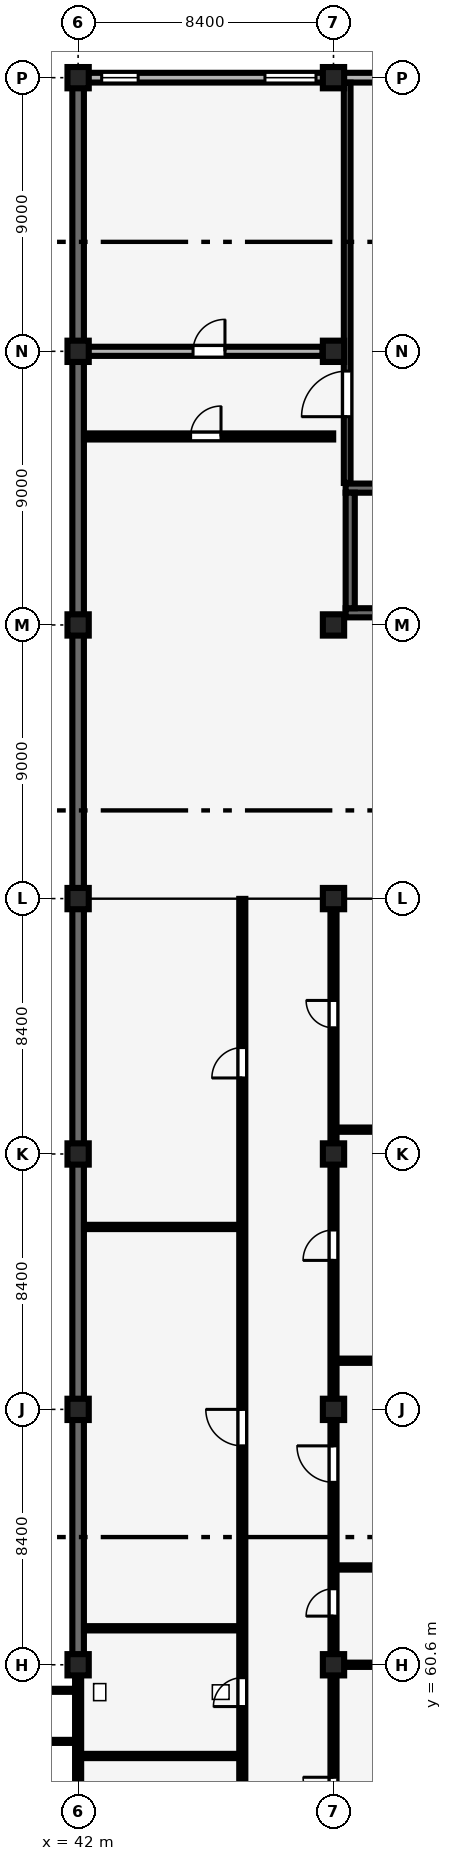
"""IFC4 building model, lengths in metres.
Left out: names, types, materials, properties, quantities, classifications, styles, units other than length and angle.
Written with IfcOpenShell. Run it as: python <this file> out.ifc"""

import sys

from ifc_helpers import new_model, si_unit, direction, frame, frame_2d, origin, origin_2d, place, context, subcontext, project, spatial, rectangle, extrude, element, fill, save


model = new_model("IFC4")
c1 = context("Model", 3, precision=1e-05, world=origin(), true_north=direction((0.0, 1.0)))
c2 = subcontext(c1, "Body", "Model", "MODEL_VIEW")
j1 = project(units=[si_unit("LENGTHUNIT", "METRE"), si_unit("PLANEANGLEUNIT", "RADIAN")], contexts=[c1])
p1 = place(None, origin())
s1 = spatial("IfcSite", under=j1, at=p1, CompositionType="ELEMENT")
p2 = place(p1, origin())
s2 = spatial("IfcBuilding", under=s1, at=p2, CompositionType="ELEMENT")
p3 = place(p2, origin())
s3 = spatial("IfcBuildingStorey", under=s2, at=p3, CompositionType="ELEMENT", Elevation=0.0)
for number, where, z_axis, x_axis in (
    (1, (42.0, 60.6, 0.0), (0.0, 0.0, 1.0), (1.0, 0.0, 0.0)),
    (2, (42.0, 69.0, 0.0), (0.0, 0.0, 1.0), (1.0, 0.0, 0.0)),
    (3, (42.0, 77.4, 0.0), (0.0, 0.0, 1.0), (1.0, 0.0, 0.0)),
    (4, (42.0, 85.8, 0.0), (0.0, 0.0, 1.0), (1.0, 0.0, 0.0)),
    (5, (42.0, 94.8, 0.0), (0.0, 0.0, 1.0), (1.0, 0.0, 0.0)),
    (6, (42.0, 103.8, 0.0), (0.0, 0.0, 1.0), (1.0, 0.0, 0.0)),
    (7, (42.0, 112.8, 0.0), (0.0, 0.0, 1.0), (1.0, 0.0, 0.0)),
    (8, (50.4, 60.6, 0.0), (0.0, 0.0, 1.0), (1.0, 0.0, 0.0)),
    (9, (50.4, 69.0, 0.0), (0.0, 0.0, 1.0), (1.0, 0.0, 0.0)),
    (10, (50.4, 77.4, 0.0), (0.0, 0.0, 1.0), (1.0, 0.0, 0.0)),
    (11, (50.4, 85.8, 0.0), (0.0, 0.0, 1.0), (1.0, 0.0, 0.0)),
    (12, (50.4, 94.8, 0.0), (0.0, 0.0, 1.0), (1.0, 0.0, 0.0)),
    (13, (50.4, 103.8, 0.0), (0.0, 0.0, 1.0), (1.0, 0.0, 0.0)),
    (14, (50.4, 112.8, 0.0), (0.0, 0.0, 1.0), (1.0, 0.0, 0.0)),
):
    element("IfcColumn", number, at=place(p3, frame(where, z_axis=z_axis, x_axis=x_axis)), inside=s3, PredefinedType="COLUMN", context=c2, shape_type="SweptSolid", body=[
        extrude(rectangle(XDim=0.7, YDim=0.7, at=origin_2d()), origin(), (0.0, 0.0, 1.0), 4.8),
    ])
p4 = place(p3, frame((42.325, 112.8, 0.0), z_axis=(0.0, 0.0, 1.0), x_axis=(1.0, 0.0, 0.0)))
e15 = element("IfcWall", 15, at=p4, inside=s3, PredefinedType="SOLIDWALL", context=c2, shape_type="SweptSolid", body=[
    extrude(rectangle(XDim=7.75, YDim=0.32, at=frame_2d((3.875, 0.0))), origin(), (0.0, 0.0, 1.0), 3.92),
])
p5 = place(p4, frame((0.45, 0.0, 0.9)))
e16 = element("IfcOpeningElement", 16, at=p5, cuts=e15, PredefinedType="OPENING", context=c2, shape_type="SweptSolid", body=[
    extrude(rectangle(XDim=1.2, YDim=1.8, at=frame_2d((0.6, 0.9))), frame((0.0, 0.17, 0.0), z_axis=(0.0, -1.0, 0.0), x_axis=(1.0, 0.0, 0.0)), (0.0, 0.0, 1.0), 0.34),
])
p6 = place(p4, frame((5.82, 0.0, 0.9)))
e17 = element("IfcOpeningElement", 17, at=p6, cuts=e15, PredefinedType="OPENING", context=c2, shape_type="SweptSolid", body=[
    extrude(rectangle(XDim=1.68, YDim=2.4, at=frame_2d((0.84, 1.2))), frame((0.0, 0.17, 0.0), z_axis=(0.0, -1.0, 0.0), x_axis=(1.0, 0.0, 0.0)), (0.0, 0.0, 1.0), 0.34),
])
p7 = place(p3, frame((50.725, 112.8, 0.0), z_axis=(0.0, 0.0, 1.0), x_axis=(1.0, 0.0, 0.0)))
e18 = element("IfcWall", 18, at=p7, inside=s3, PredefinedType="SOLIDWALL", context=c2, shape_type="SweptSolid", body=[
    extrude(rectangle(XDim=7.75, YDim=0.32, at=frame_2d((3.875, 0.0))), origin(), (0.0, 0.0, 1.0), 3.87),
])
p8 = place(p7, frame((1.125, 0.0, 0.0)))
e19 = element("IfcOpeningElement", 19, at=p8, cuts=e18, PredefinedType="OPENING", context=c2, shape_type="SweptSolid", body=[
    extrude(rectangle(XDim=1.65, YDim=2.25, at=frame_2d((0.825, 1.125))), frame((0.0, 0.17, 0.0), z_axis=(0.0, -1.0, 0.0), x_axis=(1.0, 0.0, 0.0)), (0.0, 0.0, 1.0), 0.34),
])
for number, where, z_axis, x_axis in (
    (20, (42.0, 86.125, 0.0), (0.0, 0.0, 1.0), (0.0, 1.0, 0.0)),
    (21, (42.0, 95.125, 0.0), (0.0, 0.0, 1.0), (0.0, 1.0, 0.0)),
    (22, (42.0, 104.125, 0.0), (0.0, 0.0, 1.0), (0.0, 1.0, 0.0)),
):
    element("IfcWall", number, at=place(p3, frame(where, z_axis=z_axis, x_axis=x_axis)), inside=s3, PredefinedType="SHEAR", context=c2, shape_type="SweptSolid", body=[
        extrude(rectangle(XDim=8.35, YDim=0.38, at=frame_2d((4.175, 0.0))), origin(), (0.0, 0.0, 1.0), 3.912),
    ])
for number, where, z_axis, x_axis in (
    (23, (42.0, 60.925, 0.0), (0.0, 0.0, 1.0), (0.0, 1.0, 0.0)),
    (24, (42.0, 69.325, 0.0), (0.0, 0.0, 1.0), (0.0, 1.0, 0.0)),
    (25, (42.0, 77.725, 0.0), (0.0, 0.0, 1.0), (0.0, 1.0, 0.0)),
):
    element("IfcWall", number, at=place(p3, frame(where, z_axis=z_axis, x_axis=x_axis)), inside=s3, PredefinedType="SHEAR", context=c2, shape_type="SweptSolid", body=[
        extrude(rectangle(XDim=7.75, YDim=0.38, at=frame_2d((3.875, 0.0))), origin(), (0.0, 0.0, 1.0), 3.952),
    ])
p9 = place(p3, frame((50.8, 95.2, 0.0), z_axis=(0.0, 0.0, 1.0), x_axis=(1.0, 0.0, 0.0)))
e26 = element("IfcWall", 26, at=p9, inside=s3, PredefinedType="SHEAR", context=c2, shape_type="SweptSolid", body=[
    extrude(rectangle(XDim=7.6, YDim=0.3, at=frame_2d((3.8, 0.0))), origin(), (0.0, 0.0, 1.0), 4.625),
])
p10 = place(p3, frame((50.8, 99.3, 0.0), z_axis=(0.0, 0.0, 1.0), x_axis=(1.0, 0.0, 0.0)))
e27 = element("IfcWall", 27, at=p10, inside=s3, PredefinedType="SHEAR", context=c2, shape_type="SweptSolid", body=[
    extrude(rectangle(XDim=7.6, YDim=0.3, at=frame_2d((3.8, 0.0))), origin(), (0.0, 0.0, 1.0), 4.625),
])
p11 = place(p10, frame((1.2, 0.0, 0.0)))
e28 = element("IfcOpeningElement", 28, at=p11, cuts=e27, PredefinedType="OPENING", context=c2, shape_type="SweptSolid", body=[
    extrude(rectangle(XDim=1.6, YDim=2.2, at=frame_2d((0.8, 1.1))), frame((0.0, 0.16, 0.0), z_axis=(0.0, -1.0, 0.0), x_axis=(1.0, 0.0, 0.0)), (0.0, 0.0, 1.0), 0.32),
])
p12 = place(p3, frame((50.95, 95.35, 0.0), z_axis=(0.0, 0.0, 1.0), x_axis=(0.0, 1.0, 0.0)))
e29 = element("IfcWall", 29, at=p12, inside=s3, PredefinedType="SHEAR", context=c2, shape_type="SweptSolid", body=[
    extrude(rectangle(XDim=3.8, YDim=0.3, at=frame_2d((1.9, 0.0))), origin(), (0.0, 0.0, 1.0), 4.625),
])
p13 = place(p3, frame((42.105, 57.6, 0.0), z_axis=(0.0, 0.0, 1.0), x_axis=(1.0, 0.0, 0.0)))
e30 = element("IfcWall", 30, at=p13, inside=s3, PredefinedType="PARTITIONING", context=c2, shape_type="SweptSolid", body=[
    extrude(rectangle(XDim=5.19, YDim=0.14, at=frame_2d((2.595, 0.0))), origin(), (0.0, 0.0, 1.0), 4.11),
])
for number, where, z_axis, x_axis in (
    (31, (42.195, 61.8, 0.0), (0.0, 0.0, 1.0), (1.0, 0.0, 0.0)),
    (32, (42.195, 75.0, 0.0), (0.0, 0.0, 1.0), (1.0, 0.0, 0.0)),
):
    element("IfcWall", number, at=place(p3, frame(where, z_axis=z_axis, x_axis=x_axis)), inside=s3, PredefinedType="PARTITIONING", context=c2, shape_type="SweptSolid", body=[
        extrude(rectangle(XDim=5.1, YDim=0.14, at=frame_2d((2.55, 0.0))), origin(), (0.0, 0.0, 1.0), 4.5),
    ])
p14 = place(p3, frame((47.4, 18.165, 0.0), z_axis=(0.0, 0.0, 1.0), x_axis=(0.0, 1.0, 0.0)))
e33 = element("IfcWall", 33, at=p14, inside=s3, PredefinedType="PARTITIONING", context=c2, shape_type="SweptSolid", body=[
    extrude(rectangle(XDim=67.625, YDim=0.2, at=frame_2d((33.812, 0.0))), origin(), (0.0, 0.0, 1.0), 4.5),
])
p15 = place(p14, frame((2.535, 0.0, 0.0)))
e34 = element("IfcOpeningElement", 34, at=p15, cuts=e33, PredefinedType="OPENING", context=c2, shape_type="SweptSolid", body=[
    extrude(rectangle(XDim=1.0, YDim=2.25, at=frame_2d((0.5, 1.125))), frame((0.0, 0.11, 0.0), z_axis=(0.0, -1.0, 0.0), x_axis=(1.0, 0.0, 0.0)), (0.0, 0.0, 1.0), 0.22),
])
p16 = place(p14, frame((6.685, 0.0, 0.0)))
e35 = element("IfcOpeningElement", 35, at=p16, cuts=e33, PredefinedType="OPENING", context=c2, shape_type="SweptSolid", body=[
    extrude(rectangle(XDim=1.5, YDim=2.2, at=frame_2d((0.75, 1.1))), frame((0.0, 0.11, 0.0), z_axis=(0.0, -1.0, 0.0), x_axis=(1.0, 0.0, 0.0)), (0.0, 0.0, 1.0), 0.22),
])
p17 = place(p14, frame((12.535, 0.0, 0.0)))
e36 = element("IfcOpeningElement", 36, at=p17, cuts=e33, PredefinedType="OPENING", context=c2, shape_type="SweptSolid", body=[
    extrude(rectangle(XDim=1.0, YDim=2.15, at=frame_2d((0.5, 1.075))), frame((0.0, 0.11, 0.0), z_axis=(0.0, -1.0, 0.0), x_axis=(1.0, 0.0, 0.0)), (0.0, 0.0, 1.0), 0.22),
])
p18 = place(p14, frame((20.935, 0.0, 0.0)))
e37 = element("IfcOpeningElement", 37, at=p18, cuts=e33, PredefinedType="OPENING", context=c2, shape_type="SweptSolid", body=[
    extrude(rectangle(XDim=1.0, YDim=2.15, at=frame_2d((0.5, 1.075))), frame((0.0, 0.11, 0.0), z_axis=(0.0, -1.0, 0.0), x_axis=(1.0, 0.0, 0.0)), (0.0, 0.0, 1.0), 0.22),
])
p19 = place(p14, frame((29.36, 0.0, 0.0)))
e38 = element("IfcOpeningElement", 38, at=p19, cuts=e33, PredefinedType="OPENING", context=c2, shape_type="SweptSolid", body=[
    extrude(rectangle(XDim=0.95, YDim=2.2, at=frame_2d((0.475, 1.1))), frame((0.0, 0.11, 0.0), z_axis=(0.0, -1.0, 0.0), x_axis=(1.0, 0.0, 0.0)), (0.0, 0.0, 1.0), 0.22),
])
p20 = place(p14, frame((36.26, 0.0, 0.0)))
e39 = element("IfcOpeningElement", 39, at=p20, cuts=e33, PredefinedType="OPENING", context=c2, shape_type="SweptSolid", body=[
    extrude(rectangle(XDim=0.95, YDim=2.2, at=frame_2d((0.475, 1.1))), frame((0.0, 0.11, 0.0), z_axis=(0.0, -1.0, 0.0), x_axis=(1.0, 0.0, 0.0)), (0.0, 0.0, 1.0), 0.22),
])
p21 = place(p14, frame((41.06, 0.0, 0.0)))
e40 = element("IfcOpeningElement", 40, at=p21, cuts=e33, PredefinedType="OPENING", context=c2, shape_type="SweptSolid", body=[
    extrude(rectangle(XDim=0.95, YDim=2.1, at=frame_2d((0.475, 1.05))), frame((0.0, 0.11, 0.0), z_axis=(0.0, -1.0, 0.0), x_axis=(1.0, 0.0, 0.0)), (0.0, 0.0, 1.0), 0.22),
])
p22 = place(p14, frame((49.635, 0.0, 0.0)))
e41 = element("IfcOpeningElement", 41, at=p22, cuts=e33, PredefinedType="OPENING", context=c2, shape_type="SweptSolid", body=[
    extrude(rectangle(XDim=1.2, YDim=2.2, at=frame_2d((0.6, 1.1))), frame((0.0, 0.11, 0.0), z_axis=(0.0, -1.0, 0.0), x_axis=(1.0, 0.0, 0.0)), (0.0, 0.0, 1.0), 0.22),
])
p23 = place(p14, frame((61.735, 0.0, 0.0)))
e42 = element("IfcOpeningElement", 42, at=p23, cuts=e33, PredefinedType="OPENING", context=c2, shape_type="SweptSolid", body=[
    extrude(rectangle(XDim=1.0, YDim=2.25, at=frame_2d((0.5, 1.125))), frame((0.0, 0.11, 0.0), z_axis=(0.0, -1.0, 0.0), x_axis=(1.0, 0.0, 0.0)), (0.0, 0.0, 1.0), 0.22),
])
p24 = place(p3, frame((50.505, 60.6, 0.0), z_axis=(0.0, 0.0, 1.0), x_axis=(1.0, 0.0, 0.0)))
e43 = element("IfcWall", 43, at=p24, inside=s3, PredefinedType="PARTITIONING", context=c2, shape_type="SweptSolid", body=[
    extrude(rectangle(XDim=7.935, YDim=0.14, at=frame_2d((3.968, 0.0))), origin(), (0.0, 0.0, 1.0), 3.61),
])
p25 = place(p3, frame((50.505, 63.8, 0.0), z_axis=(0.0, 0.0, 1.0), x_axis=(1.0, 0.0, 0.0)))
e44 = element("IfcWall", 44, at=p25, inside=s3, PredefinedType="PARTITIONING", context=c2, shape_type="SweptSolid", body=[
    extrude(rectangle(XDim=16.57, YDim=0.14, at=frame_2d((8.285, 0.0))), origin(), (0.0, 0.0, 1.0), 4.11),
])
for number, where, z_axis, x_axis in (
    (45, (50.505, 70.6, 0.0), (0.0, 0.0, 1.0), (1.0, 0.0, 0.0)),
    (46, (50.505, 78.2, 0.0), (0.0, 0.0, 1.0), (1.0, 0.0, 0.0)),
):
    element("IfcWall", number, at=place(p3, frame(where, z_axis=z_axis, x_axis=x_axis)), inside=s3, PredefinedType="PARTITIONING", context=c2, shape_type="SweptSolid", body=[
        extrude(rectangle(XDim=16.57, YDim=0.14, at=frame_2d((8.285, 0.0))), origin(), (0.0, 0.0, 1.0), 4.5),
    ])
p26 = place(p3, frame((50.4, 52.56, 0.0), z_axis=(0.0, 0.0, 1.0), x_axis=(0.0, 1.0, 0.0)))
e47 = element("IfcWall", 47, at=p26, inside=s3, PredefinedType="PARTITIONING", context=c2, shape_type="SweptSolid", body=[
    extrude(rectangle(XDim=7.68, YDim=0.2, at=frame_2d((3.84, 0.0))), origin(), (0.0, 0.0, 1.0), 3.91),
])
p27 = place(p26, frame((3.34, 0.0, 0.0)))
e48 = element("IfcOpeningElement", 48, at=p27, cuts=e47, PredefinedType="OPENING", context=c2, shape_type="SweptSolid", body=[
    extrude(rectangle(XDim=1.0, YDim=2.15, at=frame_2d((0.5, 1.075))), frame((0.0, 0.11, 0.0), z_axis=(0.0, -1.0, 0.0), x_axis=(1.0, 0.0, 0.0)), (0.0, 0.0, 1.0), 0.22),
])
p28 = place(p3, frame((50.4, 60.96, 0.0), z_axis=(0.0, 0.0, 1.0), x_axis=(0.0, 1.0, 0.0)))
e49 = element("IfcWall", 49, at=p28, inside=s3, PredefinedType="PARTITIONING", context=c2, shape_type="SweptSolid", body=[
    extrude(rectangle(XDim=7.68, YDim=0.2, at=frame_2d((3.84, 0.0))), origin(), (0.0, 0.0, 1.0), 3.86),
])
p29 = place(p28, frame((1.24, 0.0, 0.0)))
e50 = element("IfcOpeningElement", 50, at=p29, cuts=e49, PredefinedType="OPENING", context=c2, shape_type="SweptSolid", body=[
    extrude(rectangle(XDim=0.9, YDim=2.1, at=frame_2d((0.45, 1.05))), frame((0.0, 0.11, 0.0), z_axis=(0.0, -1.0, 0.0), x_axis=(1.0, 0.0, 0.0)), (0.0, 0.0, 1.0), 0.22),
])
p30 = place(p28, frame((5.64, 0.0, 0.0)))
e51 = element("IfcOpeningElement", 51, at=p30, cuts=e49, PredefinedType="OPENING", context=c2, shape_type="SweptSolid", body=[
    extrude(rectangle(XDim=1.2, YDim=2.2, at=frame_2d((0.6, 1.1))), frame((0.0, 0.11, 0.0), z_axis=(0.0, -1.0, 0.0), x_axis=(1.0, 0.0, 0.0)), (0.0, 0.0, 1.0), 0.22),
])
p31 = place(p3, frame((50.4, 69.36, 0.0), z_axis=(0.0, 0.0, 1.0), x_axis=(0.0, 1.0, 0.0)))
e52 = element("IfcWall", 52, at=p31, inside=s3, PredefinedType="PARTITIONING", context=c2, shape_type="SweptSolid", body=[
    extrude(rectangle(XDim=7.68, YDim=0.2, at=frame_2d((3.84, 0.0))), origin(), (0.0, 0.0, 1.0), 3.81),
])
p32 = place(p31, frame((4.54, 0.0, 0.0)))
e53 = element("IfcOpeningElement", 53, at=p32, cuts=e52, PredefinedType="OPENING", context=c2, shape_type="SweptSolid", body=[
    extrude(rectangle(XDim=1.0, YDim=2.25, at=frame_2d((0.5, 1.125))), frame((0.0, 0.11, 0.0), z_axis=(0.0, -1.0, 0.0), x_axis=(1.0, 0.0, 0.0)), (0.0, 0.0, 1.0), 0.22),
])
p33 = place(p3, frame((50.4, 77.76, 0.0), z_axis=(0.0, 0.0, 1.0), x_axis=(0.0, 1.0, 0.0)))
e54 = element("IfcWall", 54, at=p33, inside=s3, PredefinedType="PARTITIONING", context=c2, shape_type="SweptSolid", body=[
    extrude(rectangle(XDim=7.68, YDim=0.2, at=frame_2d((3.84, 0.0))), origin(), (0.0, 0.0, 1.0), 3.76),
])
p34 = place(p33, frame((3.79, 0.0, 0.0)))
e55 = element("IfcOpeningElement", 55, at=p34, cuts=e54, PredefinedType="OPENING", context=c2, shape_type="SweptSolid", body=[
    extrude(rectangle(XDim=0.9, YDim=2.1, at=frame_2d((0.45, 1.05))), frame((0.0, 0.11, 0.0), z_axis=(0.0, -1.0, 0.0), x_axis=(1.0, 0.0, 0.0)), (0.0, 0.0, 1.0), 0.22),
])
p35 = place(p3, frame((50.85, 99.47, 0.0), z_axis=(0.0, 0.0, 1.0), x_axis=(0.0, 1.0, 0.0)))
e56 = element("IfcWall", 56, at=p35, inside=s3, PredefinedType="SOLIDWALL", context=c2, shape_type="SweptSolid", body=[
    extrude(rectangle(XDim=13.165, YDim=0.22, at=frame_2d((6.583, 0.0))), origin(), (0.0, 0.0, 1.0), 4.5),
])
p36 = place(p35, frame((2.18, 0.0, 0.0)))
e57 = element("IfcOpeningElement", 57, at=p36, cuts=e56, PredefinedType="OPENING", context=c2, shape_type="SweptSolid", body=[
    extrude(rectangle(XDim=1.5, YDim=2.2, at=frame_2d((0.75, 1.1))), frame((0.0, 0.12, 0.0), z_axis=(0.0, -1.0, 0.0), x_axis=(1.0, 0.0, 0.0)), (0.0, 0.0, 1.0), 0.24),
])
p37 = place(p3, frame((42.195, 103.8, 0.0), z_axis=(0.0, 0.0, 1.0), x_axis=(1.0, 0.0, 0.0)))
e58 = element("IfcWall", 58, at=p37, inside=s3, PredefinedType="SHEAR", context=c2, shape_type="SweptSolid", body=[
    extrude(rectangle(XDim=7.845, YDim=0.3, at=frame_2d((3.922, 0.0))), origin(), (0.0, 0.0, 1.0), 3.67),
])
p38 = place(p37, frame((3.585, 0.0, 0.0)))
e59 = element("IfcOpeningElement", 59, at=p38, cuts=e58, PredefinedType="OPENING", context=c2, shape_type="SweptSolid", body=[
    extrude(rectangle(XDim=1.05, YDim=2.1, at=frame_2d((0.525, 1.05))), frame((0.0, 0.16, 0.0), z_axis=(0.0, -1.0, 0.0), x_axis=(1.0, 0.0, 0.0)), (0.0, 0.0, 1.0), 0.32),
])
p39 = place(p3, frame((42.195, 101.0, 0.0), z_axis=(0.0, 0.0, 1.0), x_axis=(1.0, 0.0, 0.0)))
e60 = element("IfcWall", 60, at=p39, inside=s3, PredefinedType="PARTITIONING", context=c2, shape_type="SweptSolid", body=[
    extrude(rectangle(XDim=8.195, YDim=0.2, at=frame_2d((4.097, 0.0))), origin(), (0.0, 0.0, 1.0), 4.07),
])
p40 = place(p39, frame((3.505, 0.0, 0.0)))
e61 = element("IfcOpeningElement", 61, at=p40, cuts=e60, PredefinedType="OPENING", context=c2, shape_type="SweptSolid", body=[
    extrude(rectangle(XDim=1.0, YDim=2.25, at=frame_2d((0.5, 1.125))), frame((0.0, 0.11, 0.0), z_axis=(0.0, -1.0, 0.0), x_axis=(1.0, 0.0, 0.0)), (0.0, 0.0, 1.0), 0.22),
])
p41 = place(p5, origin())
e62 = element("IfcWindow", 62, at=p41, inside=s3, PartitioningType="SINGLE_PANEL", PredefinedType="WINDOW", context=c2, shape_type="SweptSolid", body=[
    extrude(rectangle(XDim=1.2, YDim=1.8, at=frame_2d((0.6, 0.9))), frame((0.0, 0.03, 0.0), z_axis=(0.0, -1.0, 0.0), x_axis=(1.0, 0.0, 0.0)), (0.0, 0.0, 1.0), 0.06),
])
fill(e16, e62)
p42 = place(p6, origin())
e63 = element("IfcWindow", 63, at=p42, inside=s3, PartitioningType="SINGLE_PANEL", PredefinedType="WINDOW", context=c2, shape_type="SweptSolid", body=[
    extrude(rectangle(XDim=1.68, YDim=2.4, at=frame_2d((0.84, 1.2))), frame((0.0, 0.03, 0.0), z_axis=(0.0, -1.0, 0.0), x_axis=(1.0, 0.0, 0.0)), (0.0, 0.0, 1.0), 0.06),
])
fill(e17, e63)
p43 = place(p21, origin())
e64 = element("IfcDoor", 64, at=p43, inside=s3, OperationType="SINGLE_SWING_LEFT", PredefinedType="DOOR", context=c2, shape_type="SweptSolid", body=[
    extrude(rectangle(XDim=0.95, YDim=2.1, at=frame_2d((0.475, 1.05))), frame((0.0, 0.025, 0.0), z_axis=(0.0, -1.0, 0.0), x_axis=(1.0, 0.0, 0.0)), (0.0, 0.0, 1.0), 0.05),
])
fill(e40, e64)
p44 = place(p22, origin())
e65 = element("IfcDoor", 65, at=p44, inside=s3, OperationType="SINGLE_SWING_RIGHT", PredefinedType="DOOR", context=c2, shape_type="SweptSolid", body=[
    extrude(rectangle(XDim=1.2, YDim=2.2, at=frame_2d((0.6, 1.1))), frame((0.0, 0.025, 0.0), z_axis=(0.0, -1.0, 0.0), x_axis=(1.0, 0.0, 0.0)), (0.0, 0.0, 1.0), 0.05),
])
fill(e41, e65)
p45 = place(p23, origin())
e66 = element("IfcDoor", 66, at=p45, inside=s3, OperationType="SINGLE_SWING_LEFT", PredefinedType="DOOR", context=c2, shape_type="SweptSolid", body=[
    extrude(rectangle(XDim=1.0, YDim=2.25, at=frame_2d((0.5, 1.125))), frame((0.0, 0.025, 0.0), z_axis=(0.0, -1.0, 0.0), x_axis=(1.0, 0.0, 0.0)), (0.0, 0.0, 1.0), 0.05),
])
fill(e42, e66)
p46 = place(p27, origin())
e67 = element("IfcDoor", 67, at=p46, inside=s3, OperationType="SINGLE_SWING_RIGHT", PredefinedType="DOOR", context=c2, shape_type="SweptSolid", body=[
    extrude(rectangle(XDim=1.0, YDim=2.15, at=frame_2d((0.5, 1.075))), frame((0.0, 0.025, 0.0), z_axis=(0.0, -1.0, 0.0), x_axis=(1.0, 0.0, 0.0)), (0.0, 0.0, 1.0), 0.05),
])
fill(e48, e67)
p47 = place(p29, origin())
e68 = element("IfcDoor", 68, at=p47, inside=s3, OperationType="SINGLE_SWING_LEFT", PredefinedType="DOOR", context=c2, shape_type="SweptSolid", body=[
    extrude(rectangle(XDim=0.9, YDim=2.1, at=frame_2d((0.45, 1.05))), frame((0.0, 0.025, 0.0), z_axis=(0.0, -1.0, 0.0), x_axis=(1.0, 0.0, 0.0)), (0.0, 0.0, 1.0), 0.05),
])
fill(e50, e68)
p48 = place(p30, origin())
e69 = element("IfcDoor", 69, at=p48, inside=s3, OperationType="SINGLE_SWING_RIGHT", PredefinedType="DOOR", context=c2, shape_type="SweptSolid", body=[
    extrude(rectangle(XDim=1.2, YDim=2.2, at=frame_2d((0.6, 1.1))), frame((0.0, 0.025, 0.0), z_axis=(0.0, -1.0, 0.0), x_axis=(1.0, 0.0, 0.0)), (0.0, 0.0, 1.0), 0.05),
])
fill(e51, e69)
p49 = place(p32, origin())
e70 = element("IfcDoor", 70, at=p49, inside=s3, OperationType="SINGLE_SWING_LEFT", PredefinedType="DOOR", context=c2, shape_type="SweptSolid", body=[
    extrude(rectangle(XDim=1.0, YDim=2.25, at=frame_2d((0.5, 1.125))), frame((0.0, 0.025, 0.0), z_axis=(0.0, -1.0, 0.0), x_axis=(1.0, 0.0, 0.0)), (0.0, 0.0, 1.0), 0.05),
])
fill(e53, e70)
p50 = place(p34, origin())
e71 = element("IfcDoor", 71, at=p50, inside=s3, OperationType="SINGLE_SWING_RIGHT", PredefinedType="DOOR", context=c2, shape_type="SweptSolid", body=[
    extrude(rectangle(XDim=0.9, YDim=2.1, at=frame_2d((0.45, 1.05))), frame((0.0, 0.025, 0.0), z_axis=(0.0, -1.0, 0.0), x_axis=(1.0, 0.0, 0.0)), (0.0, 0.0, 1.0), 0.05),
])
fill(e55, e71)
p51 = place(p36, origin())
e72 = element("IfcDoor", 72, at=p51, inside=s3, OperationType="DOUBLE_DOOR_SINGLE_SWING", PredefinedType="DOOR", context=c2, shape_type="SweptSolid", body=[
    extrude(rectangle(XDim=1.5, YDim=2.2, at=frame_2d((0.75, 1.1))), frame((0.0, 0.025, 0.0), z_axis=(0.0, -1.0, 0.0), x_axis=(1.0, 0.0, 0.0)), (0.0, 0.0, 1.0), 0.05),
])
fill(e57, e72)
p52 = place(p38, origin())
e73 = element("IfcDoor", 73, at=p52, inside=s3, OperationType="SINGLE_SWING_RIGHT", PredefinedType="DOOR", context=c2, shape_type="SweptSolid", body=[
    extrude(rectangle(XDim=1.05, YDim=2.1, at=frame_2d((0.525, 1.05))), frame((0.0, 0.025, 0.0), z_axis=(0.0, -1.0, 0.0), x_axis=(1.0, 0.0, 0.0)), (0.0, 0.0, 1.0), 0.05),
])
fill(e59, e73)
p53 = place(p40, origin())
e74 = element("IfcDoor", 74, at=p53, inside=s3, OperationType="SINGLE_SWING_RIGHT", PredefinedType="DOOR", context=c2, shape_type="SweptSolid", body=[
    extrude(rectangle(XDim=1.0, YDim=2.25, at=frame_2d((0.5, 1.125))), frame((0.0, 0.025, 0.0), z_axis=(0.0, -1.0, 0.0), x_axis=(1.0, 0.0, 0.0)), (0.0, 0.0, 1.0), 0.05),
])
fill(e61, e74)
save(model, sys.argv[1])
